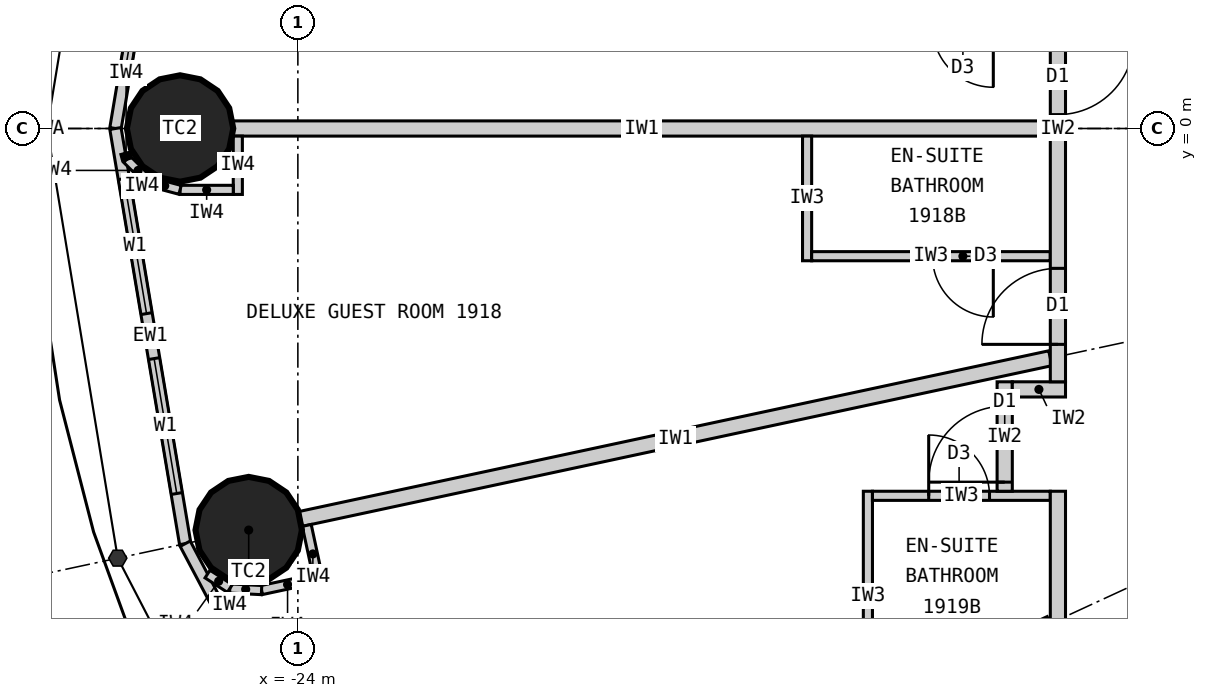
"""IFC4 building model, lengths in metres.
Left out: names, types, materials, properties, quantities, classifications, styles, units other than length and angle.
Written with IfcOpenShell. Run it as: python <this file> out.ifc"""

import sys

from ifc_helpers import new_model, si_unit, direction, frame, frame_2d, origin, origin_2d, place, context, subcontext, project, spatial, rectangle, circle, extrude, element, fill, save


model = new_model("IFC4")
c1 = context("Model", 3, precision=1e-05, world=origin(), true_north=direction((0.0, 1.0)))
c2 = subcontext(c1, "Body", "Model", "MODEL_VIEW")
j1 = project(units=[si_unit("LENGTHUNIT", "METRE"), si_unit("PLANEANGLEUNIT", "RADIAN")], contexts=[c1])
p1 = place(None, origin())
s1 = spatial("IfcSite", under=j1, at=p1, CompositionType="ELEMENT")
p2 = place(p1, origin())
s2 = spatial("IfcBuilding", under=s1, at=p2, CompositionType="ELEMENT")
p3 = place(p2, frame((0.0, 0.0, 77.1)))
s3 = spatial("IfcBuildingStorey", under=s2, at=p3, CompositionType="ELEMENT", Elevation=77.1)
for number, where, z_axis, x_axis in (
    (1, (-25.55, 0.0, 0.0), (0.0, 0.0, 1.0), (1.0, 0.0, 0.0)),
    (2, (-24.647, -5.283, 0.0), (0.0, 0.0, 1.0), (1.0, 0.0, 0.0)),
):
    element("IfcColumn", number, at=place(p3, frame(where, z_axis=z_axis, x_axis=x_axis)), inside=s3, PredefinedType="COLUMN", context=c2, shape_type="SweptSolid", body=[
        extrude(circle(Radius=0.7, at=origin_2d()), origin(), (0.0, 0.0, 1.0), 3.3),
    ])
p4 = place(p3, frame((-25.482, 5.462, 0.0), z_axis=(0.0, 0.0, 1.0), x_axis=(-0.165642551694, -0.986185857264, 0.0)))
e3 = element("IfcWall", 3, at=p4, inside=s3, PredefinedType="ELEMENTEDWALL", context=c2, shape_type="SweptSolid", body=[
    extrude(rectangle(XDim=5.539, YDim=0.15, at=frame_2d((2.77, 0.0))), origin(), (0.0, 0.0, 1.0), 3.12),
])
p5 = place(p4, frame((0.669, 0.0, 0.9)))
e4 = element("IfcOpeningElement", 4, at=p5, cuts=e3, PredefinedType="OPENING", context=c2, shape_type="SweptSolid", body=[
    extrude(rectangle(XDim=1.8, YDim=1.9, at=frame_2d((0.9, 0.95))), frame((0.0, 0.085, 0.0), z_axis=(0.0, -1.0, 0.0), x_axis=(1.0, 0.0, 0.0)), (0.0, 0.0, 1.0), 0.17),
])
p6 = place(p4, frame((3.07, 0.0, 0.9)))
e5 = element("IfcOpeningElement", 5, at=p6, cuts=e3, PredefinedType="OPENING", context=c2, shape_type="SweptSolid", body=[
    extrude(rectangle(XDim=1.8, YDim=1.9, at=frame_2d((0.9, 0.95))), frame((0.0, 0.085, 0.0), z_axis=(0.0, -1.0, 0.0), x_axis=(1.0, 0.0, 0.0)), (0.0, 0.0, 1.0), 0.17),
])
p7 = place(p3, frame((-26.4, 0.0, 0.0), z_axis=(0.0, 0.0, 1.0), x_axis=(0.165642551694, -0.986185857264, 0.0)))
e6 = element("IfcWall", 6, at=p7, inside=s3, PredefinedType="ELEMENTEDWALL", context=c2, shape_type="SweptSolid", body=[
    extrude(rectangle(XDim=5.539, YDim=0.15, at=frame_2d((2.77, 0.0))), origin(), (0.0, 0.0, 1.0), 3.12),
])
p8 = place(p7, frame((0.669, 0.0, 0.9)))
e7 = element("IfcOpeningElement", 7, at=p8, cuts=e6, PredefinedType="OPENING", context=c2, shape_type="SweptSolid", body=[
    extrude(rectangle(XDim=1.8, YDim=1.9, at=frame_2d((0.9, 0.95))), frame((0.0, 0.085, 0.0), z_axis=(0.0, -1.0, 0.0), x_axis=(1.0, 0.0, 0.0)), (0.0, 0.0, 1.0), 0.17),
])
p9 = place(p7, frame((3.07, 0.0, 0.9)))
e8 = element("IfcOpeningElement", 8, at=p9, cuts=e6, PredefinedType="OPENING", context=c2, shape_type="SweptSolid", body=[
    extrude(rectangle(XDim=1.8, YDim=1.9, at=frame_2d((0.9, 0.95))), frame((0.0, 0.085, 0.0), z_axis=(0.0, -1.0, 0.0), x_axis=(1.0, 0.0, 0.0)), (0.0, 0.0, 1.0), 0.17),
])
p10 = place(p3, frame((-25.482, -5.462, 0.0), z_axis=(0.0, 0.0, 1.0), x_axis=(0.467296867008, -0.884100468321, 0.0)))
e9 = element("IfcWall", 9, at=p10, inside=s3, PredefinedType="ELEMENTEDWALL", context=c2, shape_type="SweptSolid", body=[
    extrude(rectangle(XDim=5.734, YDim=0.15, at=frame_2d((2.867, 0.0))), origin(), (0.0, 0.0, 1.0), 3.12),
])
p11 = place(p10, frame((0.767, 0.0, 0.9)))
e10 = element("IfcOpeningElement", 10, at=p11, cuts=e9, PredefinedType="OPENING", context=c2, shape_type="SweptSolid", body=[
    extrude(rectangle(XDim=1.8, YDim=1.9, at=frame_2d((0.9, 0.95))), frame((0.0, 0.085, 0.0), z_axis=(0.0, -1.0, 0.0), x_axis=(1.0, 0.0, 0.0)), (0.0, 0.0, 1.0), 0.17),
])
p12 = place(p10, frame((3.167, 0.0, 0.9)))
e11 = element("IfcOpeningElement", 11, at=p12, cuts=e9, PredefinedType="OPENING", context=c2, shape_type="SweptSolid", body=[
    extrude(rectangle(XDim=1.8, YDim=1.9, at=frame_2d((0.9, 0.95))), frame((0.0, 0.085, 0.0), z_axis=(0.0, -1.0, 0.0), x_axis=(1.0, 0.0, 0.0)), (0.0, 0.0, 1.0), 0.17),
])
p13 = place(p3, frame((-14.1, 0.0, 0.0), z_axis=(0.0, 0.0, 1.0), x_axis=(-1.0, 0.0, 0.0)))
e12 = element("IfcWall", 12, at=p13, inside=s3, PredefinedType="PARTITIONING", context=c2, shape_type="SweptSolid", body=[
    extrude(rectangle(XDim=10.75, YDim=0.2, at=frame_2d((5.375, 0.0))), origin(), (0.0, 0.0, 1.0), 2.27),
])
p14 = place(p3, frame((-14.1, -3.022, 0.0), z_axis=(0.0, 0.0, 1.0), x_axis=(-0.977790014929, -0.209586943072, 0.0)))
e13 = element("IfcWall", 13, at=p14, inside=s3, PredefinedType="PARTITIONING", context=c2, shape_type="SweptSolid", body=[
    extrude(rectangle(XDim=10.087, YDim=0.2, at=frame_2d((5.043, 0.0))), origin(), (0.0, 0.0, 1.0), 2.32),
])
p15 = place(p3, frame((-14.1, -6.512, 0.0), z_axis=(0.0, 0.0, 1.0), x_axis=(-0.907832871056, -0.419332181247, 0.0)))
e14 = element("IfcWall", 14, at=p15, inside=s3, PredefinedType="PARTITIONING", context=c2, shape_type="SweptSolid", body=[
    extrude(rectangle(XDim=8.023, YDim=0.2, at=frame_2d((4.011, 0.0))), origin(), (0.0, 0.0, 1.0), 2.32),
])
p16 = place(p3, frame((-17.3, -0.1, 0.0), z_axis=(0.0, 0.0, 1.0), x_axis=(0.0, -1.0, 0.0)))
e15 = element("IfcWall", 15, at=p16, inside=s3, PredefinedType="PARTITIONING", context=c2, shape_type="SweptSolid", body=[
    extrude(rectangle(XDim=1.64, YDim=0.12, at=frame_2d((0.82, 0.0))), origin(), (0.0, 0.0, 1.0), 3.12),
])
p17 = place(p3, frame((-14.1, -1.68, 0.0), z_axis=(0.0, 0.0, 1.0), x_axis=(-1.0, 0.0, 0.0)))
e16 = element("IfcWall", 16, at=p17, inside=s3, PredefinedType="PARTITIONING", context=c2, shape_type="SweptSolid", body=[
    extrude(rectangle(XDim=3.14, YDim=0.12, at=frame_2d((1.57, 0.0))), origin(), (0.0, 0.0, 1.0), 3.12),
])
p18 = place(p17, frame((0.75, 0.0, 0.0)))
e17 = element("IfcOpeningElement", 17, at=p18, cuts=e16, PredefinedType="OPENING", context=c2, shape_type="SweptSolid", body=[
    extrude(rectangle(XDim=0.8, YDim=2.1, at=frame_2d((0.4, 1.05))), frame((0.0, 0.07, 0.0), z_axis=(0.0, -1.0, 0.0), x_axis=(1.0, 0.0, 0.0)), (0.0, 0.0, 1.0), 0.14),
])
p19 = place(p3, frame((-16.5, -7.521, 0.0), z_axis=(0.0, 0.0, 1.0), x_axis=(0.0, 1.0, 0.0)))
e18 = element("IfcWall", 18, at=p19, inside=s3, PredefinedType="PARTITIONING", context=c2, shape_type="SweptSolid", body=[
    extrude(rectangle(XDim=2.749, YDim=0.12, at=frame_2d((1.374, 0.0))), origin(), (0.0, 0.0, 1.0), 3.12),
])
p20 = place(p3, frame((-14.1, -4.833, 0.0), z_axis=(0.0, 0.0, 1.0), x_axis=(-1.0, 0.0, 0.0)))
e19 = element("IfcWall", 19, at=p20, inside=s3, PredefinedType="PARTITIONING", context=c2, shape_type="SweptSolid", body=[
    extrude(rectangle(XDim=2.34, YDim=0.12, at=frame_2d((1.17, 0.0))), origin(), (0.0, 0.0, 1.0), 3.12),
])
p21 = place(p20, frame((0.8, 0.0, 0.0)))
e20 = element("IfcOpeningElement", 20, at=p21, cuts=e19, PredefinedType="OPENING", context=c2, shape_type="SweptSolid", body=[
    extrude(rectangle(XDim=0.8, YDim=2.1, at=frame_2d((0.4, 1.05))), frame((0.0, 0.07, 0.0), z_axis=(0.0, -1.0, 0.0), x_axis=(1.0, 0.0, 0.0)), (0.0, 0.0, 1.0), 0.14),
])
p22 = place(p3, frame((-14.7, -3.333, 0.0), z_axis=(0.0, 0.0, 1.0), x_axis=(0.0, -1.0, 0.0)))
e21 = element("IfcWall", 21, at=p22, inside=s3, PredefinedType="PARTITIONING", context=c2, shape_type="SweptSolid", body=[
    extrude(rectangle(XDim=1.44, YDim=0.2, at=frame_2d((0.72, 0.0))), origin(), (0.0, 0.0, 1.0), 3.12),
])
p23 = place(p22, frame((0.32, 0.0, 0.0)))
e22 = element("IfcOpeningElement", 22, at=p23, cuts=e21, PredefinedType="OPENING", context=c2, shape_type="SweptSolid", body=[
    extrude(rectangle(XDim=1.0, YDim=2.2, at=frame_2d((0.5, 1.1))), frame((0.0, 0.11, 0.0), z_axis=(0.0, -1.0, 0.0), x_axis=(1.0, 0.0, 0.0)), (0.0, 0.0, 1.0), 0.22),
])
p24 = place(p3, frame((-13.9, -3.433, 0.0), z_axis=(0.0, 0.0, 1.0), x_axis=(-1.0, 0.0, 0.0)))
e23 = element("IfcWall", 23, at=p24, inside=s3, PredefinedType="PARTITIONING", context=c2, shape_type="SweptSolid", body=[
    extrude(rectangle(XDim=0.7, YDim=0.2, at=frame_2d((0.35, 0.0))), origin(), (0.0, 0.0, 1.0), 2.32),
])
p25 = place(p3, frame((-14.0, 3.333, 0.0), z_axis=(0.0, 0.0, 1.0), x_axis=(0.0, -1.0, 0.0)))
e24 = element("IfcWall", 24, at=p25, inside=s3, PredefinedType="PARTITIONING", context=c2, shape_type="SweptSolid", body=[
    extrude(rectangle(XDim=6.665, YDim=0.2, at=frame_2d((3.333, 0.0))), origin(), (0.0, 0.0, 1.0), 3.12),
])
p26 = place(p25, frame((2.15, 0.0, 0.0)))
e25 = element("IfcOpeningElement", 25, at=p26, cuts=e24, PredefinedType="OPENING", context=c2, shape_type="SweptSolid", body=[
    extrude(rectangle(XDim=1.0, YDim=2.2, at=frame_2d((0.5, 1.1))), frame((0.0, 0.11, 0.0), z_axis=(0.0, -1.0, 0.0), x_axis=(1.0, 0.0, 0.0)), (0.0, 0.0, 1.0), 0.22),
])
p27 = place(p25, frame((5.173, 0.0, 0.0)))
e26 = element("IfcOpeningElement", 26, at=p27, cuts=e24, PredefinedType="OPENING", context=c2, shape_type="SweptSolid", body=[
    extrude(rectangle(XDim=1.0, YDim=2.2, at=frame_2d((0.5, 1.1))), frame((0.0, 0.11, 0.0), z_axis=(0.0, -1.0, 0.0), x_axis=(1.0, 0.0, 0.0)), (0.0, 0.0, 1.0), 0.22),
])
p28 = place(p3, frame((-14.0, -4.772, 0.0), z_axis=(0.0, 0.0, 1.0), x_axis=(0.0, -1.0, 0.0)))
e27 = element("IfcWall", 27, at=p28, inside=s3, PredefinedType="PARTITIONING", context=c2, shape_type="SweptSolid", body=[
    extrude(rectangle(XDim=5.127, YDim=0.2, at=frame_2d((2.564, 0.0))), origin(), (0.0, 0.0, 1.0), 3.12),
])
p29 = place(p28, frame((4.025, 0.0, 0.0)))
e28 = element("IfcOpeningElement", 28, at=p29, cuts=e27, PredefinedType="OPENING", context=c2, shape_type="SweptSolid", body=[
    extrude(rectangle(XDim=1.0, YDim=2.2, at=frame_2d((0.5, 1.1))), frame((0.0, 0.11, 0.0), z_axis=(0.0, -1.0, 0.0), x_axis=(1.0, 0.0, 0.0)), (0.0, 0.0, 1.0), 0.22),
])
p30 = place(p3, frame((-24.79, -0.1, 0.0), z_axis=(0.0, 0.0, 1.0), x_axis=(0.0, -1.0, 0.0)))
e29 = element("IfcWall", 29, at=p30, inside=s3, PredefinedType="PARTITIONING", context=c2, shape_type="SweptSolid", body=[
    extrude(rectangle(XDim=0.767, YDim=0.12, at=frame_2d((0.384, 0.0))), origin(), (0.0, 0.0, 1.0), 3.12),
])
p31 = place(p3, frame((-24.85, -0.808, 0.0), z_axis=(0.0, 0.0, 1.0), x_axis=(-1.0, 0.0, 0.0)))
e30 = element("IfcWall", 30, at=p31, inside=s3, PredefinedType="PARTITIONING", context=c2, shape_type="SweptSolid", body=[
    extrude(rectangle(XDim=0.7, YDim=0.12, at=frame_2d((0.35, 0.0))), origin(), (0.0, 0.0, 1.0), 3.12),
])
p32 = place(p3, frame((-25.55, -0.808, 0.0), z_axis=(0.0, 0.0, 1.0), x_axis=(-0.965807183573, 0.2592614205, 0.0)))
e31 = element("IfcWall", 31, at=p32, inside=s3, PredefinedType="PARTITIONING", context=c2, shape_type="SweptSolid", body=[
    extrude(rectangle(XDim=0.418, YDim=0.12, at=frame_2d((0.209, 0.0))), origin(), (0.0, 0.0, 1.0), 3.12),
])
p33 = place(p3, frame((-25.954, -0.699, 0.0), z_axis=(0.0, 0.0, 1.0), x_axis=(-0.707106781187, 0.707106781187, 0.0)))
e32 = element("IfcWall", 32, at=p33, inside=s3, PredefinedType="PARTITIONING", context=c2, shape_type="SweptSolid", body=[
    extrude(rectangle(XDim=0.418, YDim=0.12, at=frame_2d((0.209, 0.0))), origin(), (0.0, 0.0, 1.0), 3.12),
])
p34 = place(p3, frame((-26.249, -0.404, 0.0), z_axis=(0.0, 0.0, 1.0), x_axis=(-0.259754282609, 0.965674744759, 0.0)))
e33 = element("IfcWall", 33, at=p34, inside=s3, PredefinedType="PARTITIONING", context=c2, shape_type="SweptSolid", body=[
    extrude(rectangle(XDim=0.08, YDim=0.12, at=frame_2d((0.04, 0.0))), origin(), (0.0, 0.0, 1.0), 3.12),
])
p35 = place(p3, frame((-23.883, -5.222, 0.0), z_axis=(0.0, 0.0, 1.0), x_axis=(0.209311842415, -0.977848941619, 0.0)))
e34 = element("IfcWall", 34, at=p35, inside=s3, PredefinedType="PARTITIONING", context=c2, shape_type="SweptSolid", body=[
    extrude(rectangle(XDim=0.768, YDim=0.12, at=frame_2d((0.384, 0.0))), origin(), (0.0, 0.0, 1.0), 3.12),
])
p36 = place(p3, frame((-23.793, -5.926, 0.0), z_axis=(0.0, 0.0, 1.0), x_axis=(-0.977792206673, -0.209576717621, 0.0)))
e35 = element("IfcWall", 35, at=p36, inside=s3, PredefinedType="PARTITIONING", context=c2, shape_type="SweptSolid", body=[
    extrude(rectangle(XDim=0.7, YDim=0.12, at=frame_2d((0.35, 0.0))), origin(), (0.0, 0.0, 1.0), 3.12),
])
p37 = place(p3, frame((-24.478, -6.073, 0.0), z_axis=(0.0, 0.0, 1.0), x_axis=(-0.998708262812, 0.05081147302, 0.0)))
e36 = element("IfcWall", 36, at=p37, inside=s3, PredefinedType="PARTITIONING", context=c2, shape_type="SweptSolid", body=[
    extrude(rectangle(XDim=0.418, YDim=0.12, at=frame_2d((0.209, 0.0))), origin(), (0.0, 0.0, 1.0), 3.12),
])
p38 = place(p3, frame((-24.895, -6.052, 0.0), z_axis=(0.0, 0.0, 1.0), x_axis=(-0.839495197275, 0.54336710772, 0.0)))
e37 = element("IfcWall", 37, at=p38, inside=s3, PredefinedType="PARTITIONING", context=c2, shape_type="SweptSolid", body=[
    extrude(rectangle(XDim=0.35, YDim=0.12, at=frame_2d((0.175, 0.0))), origin(), (0.0, 0.0, 1.0), 3.12),
])
p39 = place(p6, origin())
e38 = element("IfcWindow", 38, at=p39, inside=s3, PartitioningType="SINGLE_PANEL", PredefinedType="WINDOW", context=c2, shape_type="SweptSolid", body=[
    extrude(rectangle(XDim=1.8, YDim=1.9, at=frame_2d((0.9, 0.95))), frame((0.0, 0.03, 0.0), z_axis=(0.0, -1.0, 0.0), x_axis=(1.0, 0.0, 0.0)), (0.0, 0.0, 1.0), 0.06),
])
fill(e5, e38)
p40 = place(p8, origin())
e39 = element("IfcWindow", 39, at=p40, inside=s3, PartitioningType="SINGLE_PANEL", PredefinedType="WINDOW", context=c2, shape_type="SweptSolid", body=[
    extrude(rectangle(XDim=1.8, YDim=1.9, at=frame_2d((0.9, 0.95))), frame((0.0, 0.03, 0.0), z_axis=(0.0, -1.0, 0.0), x_axis=(1.0, 0.0, 0.0)), (0.0, 0.0, 1.0), 0.06),
])
fill(e7, e39)
p41 = place(p9, origin())
e40 = element("IfcWindow", 40, at=p41, inside=s3, PartitioningType="SINGLE_PANEL", PredefinedType="WINDOW", context=c2, shape_type="SweptSolid", body=[
    extrude(rectangle(XDim=1.8, YDim=1.9, at=frame_2d((0.9, 0.95))), frame((0.0, 0.03, 0.0), z_axis=(0.0, -1.0, 0.0), x_axis=(1.0, 0.0, 0.0)), (0.0, 0.0, 1.0), 0.06),
])
fill(e8, e40)
p42 = place(p11, origin())
e41 = element("IfcWindow", 41, at=p42, inside=s3, PartitioningType="SINGLE_PANEL", PredefinedType="WINDOW", context=c2, shape_type="SweptSolid", body=[
    extrude(rectangle(XDim=1.8, YDim=1.9, at=frame_2d((0.9, 0.95))), frame((0.0, 0.03, 0.0), z_axis=(0.0, -1.0, 0.0), x_axis=(1.0, 0.0, 0.0)), (0.0, 0.0, 1.0), 0.06),
])
fill(e10, e41)
p43 = place(p26, origin())
e42 = element("IfcDoor", 42, at=p43, inside=s3, OperationType="SINGLE_SWING_LEFT", PredefinedType="DOOR", context=c2, shape_type="SweptSolid", body=[
    extrude(rectangle(XDim=1.0, YDim=2.2, at=frame_2d((0.5, 1.1))), frame((0.0, 0.025, 0.0), z_axis=(0.0, -1.0, 0.0), x_axis=(1.0, 0.0, 0.0)), (0.0, 0.0, 1.0), 0.05),
])
fill(e25, e42)
p44 = place(p18, origin())
e43 = element("IfcDoor", 43, at=p44, inside=s3, OperationType="SINGLE_SWING_LEFT", PredefinedType="DOOR", context=c2, shape_type="SweptSolid", body=[
    extrude(rectangle(XDim=0.8, YDim=2.1, at=frame_2d((0.4, 1.05))), frame((0.0, 0.025, 0.0), z_axis=(0.0, -1.0, 0.0), x_axis=(1.0, 0.0, 0.0)), (0.0, 0.0, 1.0), 0.05),
])
fill(e17, e43)
p45 = place(p27, origin())
e44 = element("IfcDoor", 44, at=p45, inside=s3, OperationType="SINGLE_SWING_RIGHT", PredefinedType="DOOR", context=c2, shape_type="SweptSolid", body=[
    extrude(rectangle(XDim=1.0, YDim=2.2, at=frame_2d((0.5, 1.1))), frame((0.0, 0.025, 0.0), z_axis=(0.0, -1.0, 0.0), x_axis=(1.0, 0.0, 0.0)), (0.0, 0.0, 1.0), 0.05),
])
fill(e26, e44)
p46 = place(p21, origin())
e45 = element("IfcDoor", 45, at=p46, inside=s3, OperationType="SINGLE_SWING_RIGHT", PredefinedType="DOOR", context=c2, shape_type="SweptSolid", body=[
    extrude(rectangle(XDim=0.8, YDim=2.1, at=frame_2d((0.4, 1.05))), frame((0.0, 0.025, 0.0), z_axis=(0.0, -1.0, 0.0), x_axis=(1.0, 0.0, 0.0)), (0.0, 0.0, 1.0), 0.05),
])
fill(e20, e45)
p47 = place(p23, origin())
e46 = element("IfcDoor", 46, at=p47, inside=s3, OperationType="SINGLE_SWING_RIGHT", PredefinedType="DOOR", context=c2, shape_type="SweptSolid", body=[
    extrude(rectangle(XDim=1.0, YDim=2.2, at=frame_2d((0.5, 1.1))), frame((0.0, 0.025, 0.0), z_axis=(0.0, -1.0, 0.0), x_axis=(1.0, 0.0, 0.0)), (0.0, 0.0, 1.0), 0.05),
])
fill(e22, e46)
save(model, sys.argv[1])
